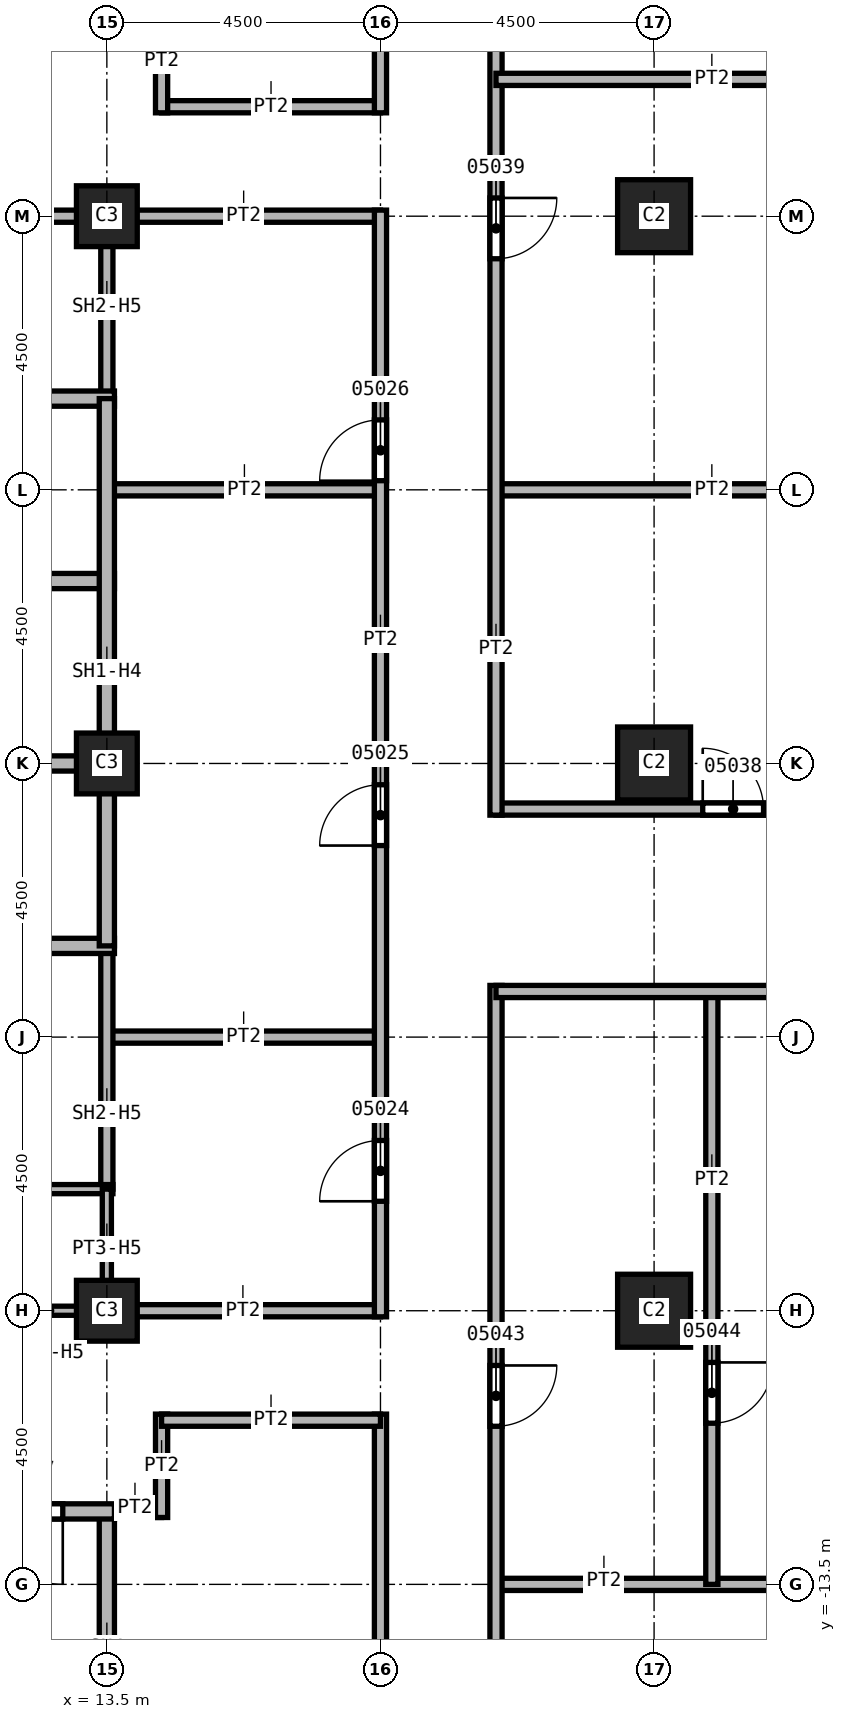
"""IFC4 building model, lengths in metres.
Left out: names, types, materials, properties, quantities, classifications, styles, units other than length and angle.
Written with IfcOpenShell. Run it as: python <this file> out.ifc"""

import sys

from ifc_helpers import new_model, si_unit, direction, frame, frame_2d, origin, origin_2d, place, context, subcontext, project, spatial, rectangle, extrude, element, fill, save


model = new_model("IFC4")
c1 = context("Model", 3, precision=1e-05, world=origin(), true_north=direction((0.0, 1.0)))
c2 = subcontext(c1, "Body", "Model", "MODEL_VIEW")
j1 = project(units=[si_unit("LENGTHUNIT", "METRE"), si_unit("PLANEANGLEUNIT", "RADIAN")], contexts=[c1])
p1 = place(None, origin())
s1 = spatial("IfcSite", under=j1, at=p1, CompositionType="ELEMENT")
p2 = place(p1, origin())
s2 = spatial("IfcBuilding", under=s1, at=p2, CompositionType="ELEMENT")
p3 = place(p2, frame((0.0, 0.0, 112.0)))
s3 = spatial("IfcBuildingStorey", under=s2, at=p3, CompositionType="ELEMENT", Elevation=112.0)
for number, where, z_axis, x_axis in (
    (1, (22.5, 0.0, 0.0), (0.0, 0.0, 1.0), (1.0, 0.0, 0.0)),
    (2, (22.5, 9.0, 0.0), (0.0, 0.0, 1.0), (1.0, 0.0, 0.0)),
    (3, (22.5, -9.0, 0.0), (0.0, 0.0, 1.0), (1.0, 0.0, 0.0)),
):
    element("IfcColumn", number, at=place(p3, frame(where, z_axis=z_axis, x_axis=x_axis)), inside=s3, PredefinedType="COLUMN", context=c2, shape_type="SweptSolid", body=[
        extrude(rectangle(XDim=1.2, YDim=1.2, at=origin_2d()), origin(), (0.0, 0.0, 1.0), 3.7),
    ])
for number, where, z_axis, x_axis in (
    (4, (13.5, 0.0, 0.0), (0.0, 0.0, 1.0), (1.0, 0.0, 0.0)),
    (5, (13.5, 9.0, 0.0), (0.0, 0.0, 1.0), (1.0, 0.0, 0.0)),
    (6, (13.5, -9.0, 0.0), (0.0, 0.0, 1.0), (1.0, 0.0, 0.0)),
):
    element("IfcColumn", number, at=place(p3, frame(where, z_axis=z_axis, x_axis=x_axis)), inside=s3, PredefinedType="COLUMN", context=c2, shape_type="SweptSolid", body=[
        extrude(rectangle(XDim=1.0, YDim=1.0, at=origin_2d()), origin(), (0.0, 0.0, 1.0), 3.7),
    ])
for number, where, z_axis, x_axis in (
    (7, (13.5, -9.0, 0.0), (0.0, 0.0, 1.0), (1.0, 0.0, 0.0)),
    (8, (13.5, -4.5, 0.0), (0.0, 0.0, 1.0), (1.0, 0.0, 0.0)),
    (9, (13.5, 4.5, 0.0), (0.0, 0.0, 1.0), (1.0, 0.0, 0.0)),
):
    element("IfcWall", number, at=place(p3, frame(where, z_axis=z_axis, x_axis=x_axis)), inside=s3, PredefinedType="PARTITIONING", context=c2, shape_type="SweptSolid", body=[
        extrude(rectangle(XDim=4.5, YDim=0.2, at=frame_2d((2.25, 0.0))), origin(), (0.0, 0.0, 1.0), 3.7),
    ])
p4 = place(p3, frame((14.4, -12.3, 0.0), z_axis=(0.0, 0.0, 1.0), x_axis=(-1.0, 0.0, 0.0)))
e10 = element("IfcWall", 10, at=p4, inside=s3, PredefinedType="PARTITIONING", context=c2, shape_type="SweptSolid", body=[
    extrude(rectangle(XDim=1.025, YDim=0.2, at=frame_2d((0.512, 0.0))), origin(), (0.0, 0.0, 1.0), 3.7),
])
p5 = place(p3, frame((14.4, -10.7, 0.0), z_axis=(0.0, 0.0, 1.0), x_axis=(0.0, -1.0, 0.0)))
e11 = element("IfcWall", 11, at=p5, inside=s3, PredefinedType="PARTITIONING", context=c2, shape_type="SweptSolid", body=[
    extrude(rectangle(XDim=1.7, YDim=0.2, at=frame_2d((0.85, 0.0))), origin(), (0.0, 0.0, 1.0), 3.7),
])
p6 = place(p3, frame((18.0, 9.0, 0.0), z_axis=(0.0, 0.0, 1.0), x_axis=(-1.0, 0.0, 0.0)))
e12 = element("IfcWall", 12, at=p6, inside=s3, PredefinedType="PARTITIONING", context=c2, shape_type="SweptSolid", body=[
    extrude(rectangle(XDim=4.5, YDim=0.2, at=frame_2d((2.25, 0.0))), origin(), (0.0, 0.0, 1.0), 3.7),
])
p7 = place(p3, frame((14.4, 10.8, 0.0), z_axis=(0.0, 0.0, 1.0), x_axis=(1.0, 0.0, 0.0)))
e13 = element("IfcWall", 13, at=p7, inside=s3, PredefinedType="PARTITIONING", context=c2, shape_type="SweptSolid", body=[
    extrude(rectangle(XDim=3.6, YDim=0.2, at=frame_2d((1.8, 0.0))), origin(), (0.0, 0.0, 1.0), 3.7),
])
p8 = place(p3, frame((14.4, 12.3, 0.0), z_axis=(0.0, 0.0, 1.0), x_axis=(0.0, -1.0, 0.0)))
e14 = element("IfcWall", 14, at=p8, inside=s3, PredefinedType="PARTITIONING", context=c2, shape_type="SweptSolid", body=[
    extrude(rectangle(XDim=1.6, YDim=0.2, at=frame_2d((0.8, 0.0))), origin(), (0.0, 0.0, 1.0), 3.7),
])
p9 = place(p3, frame((18.0, -24.2, 0.0), z_axis=(0.0, 0.0, 1.0), x_axis=(0.0, 1.0, 0.0)))
e15 = element("IfcWall", 15, at=p9, inside=s3, PredefinedType="PARTITIONING", context=c2, shape_type="SweptSolid", body=[
    extrude(rectangle(XDim=13.5, YDim=0.2, at=frame_2d((6.75, 0.0))), origin(), (0.0, 0.0, 1.0), 3.7),
])
p10 = place(p9, frame((6.4, 0.0, 0.0)))
e16 = element("IfcOpeningElement", 16, at=p10, cuts=e15, PredefinedType="OPENING", context=c2, shape_type="SweptSolid", body=[
    extrude(rectangle(XDim=1.0, YDim=2.1, at=frame_2d((0.5, 1.05))), frame((0.0, 0.1, 0.0), z_axis=(0.0, -1.0, 0.0), x_axis=(1.0, 0.0, 0.0)), (0.0, 0.0, 1.0), 0.2),
])
p11 = place(p3, frame((18.0, -10.8, 0.0), z_axis=(0.0, 0.0, 1.0), x_axis=(-1.0, 0.0, 0.0)))
e17 = element("IfcWall", 17, at=p11, inside=s3, PredefinedType="PARTITIONING", context=c2, shape_type="SweptSolid", body=[
    extrude(rectangle(XDim=3.6, YDim=0.2, at=frame_2d((1.8, 0.0))), origin(), (0.0, 0.0, 1.0), 3.7),
])
p12 = place(p3, frame((18.0, -9.1, 0.0), z_axis=(0.0, 0.0, 1.0), x_axis=(0.0, 1.0, 0.0)))
e18 = element("IfcWall", 18, at=p12, inside=s3, PredefinedType="PARTITIONING", context=c2, shape_type="SweptSolid", body=[
    extrude(rectangle(XDim=18.2, YDim=0.2, at=frame_2d((9.1, 0.0))), origin(), (0.0, 0.0, 1.0), 3.7),
])
p13 = place(p12, frame((1.9, 0.0, 0.0)))
e19 = element("IfcOpeningElement", 19, at=p13, cuts=e18, PredefinedType="OPENING", context=c2, shape_type="SweptSolid", body=[
    extrude(rectangle(XDim=1.0, YDim=2.1, at=frame_2d((0.5, 1.05))), frame((0.0, 0.1, 0.0), z_axis=(0.0, -1.0, 0.0), x_axis=(1.0, 0.0, 0.0)), (0.0, 0.0, 1.0), 0.2),
])
p14 = place(p12, frame((7.75, 0.0, 0.0)))
e20 = element("IfcOpeningElement", 20, at=p14, cuts=e18, PredefinedType="OPENING", context=c2, shape_type="SweptSolid", body=[
    extrude(rectangle(XDim=1.0, YDim=2.1, at=frame_2d((0.5, 1.05))), frame((0.0, 0.1, 0.0), z_axis=(0.0, -1.0, 0.0), x_axis=(1.0, 0.0, 0.0)), (0.0, 0.0, 1.0), 0.2),
])
p15 = place(p12, frame((13.75, 0.0, 0.0)))
e21 = element("IfcOpeningElement", 21, at=p15, cuts=e18, PredefinedType="OPENING", context=c2, shape_type="SweptSolid", body=[
    extrude(rectangle(XDim=1.0, YDim=2.1, at=frame_2d((0.5, 1.05))), frame((0.0, 0.1, 0.0), z_axis=(0.0, -1.0, 0.0), x_axis=(1.0, 0.0, 0.0)), (0.0, 0.0, 1.0), 0.2),
])
p16 = place(p3, frame((18.0, 10.7, 0.0), z_axis=(0.0, 0.0, 1.0), x_axis=(0.0, 1.0, 0.0)))
e22 = element("IfcWall", 22, at=p16, inside=s3, PredefinedType="PARTITIONING", context=c2, shape_type="SweptSolid", body=[
    extrude(rectangle(XDim=13.5, YDim=0.2, at=frame_2d((6.75, 0.0))), origin(), (0.0, 0.0, 1.0), 3.7),
])
p17 = place(p16, frame((9.8, 0.0, 0.0)))
e23 = element("IfcOpeningElement", 23, at=p17, cuts=e22, PredefinedType="OPENING", context=c2, shape_type="SweptSolid", body=[
    extrude(rectangle(XDim=1.0, YDim=2.1, at=frame_2d((0.5, 1.05))), frame((0.0, 0.1, 0.0), z_axis=(0.0, -1.0, 0.0), x_axis=(1.0, 0.0, 0.0)), (0.0, 0.0, 1.0), 0.2),
])
p18 = place(p3, frame((19.9, -13.5, 0.0), z_axis=(0.0, 0.0, 1.0), x_axis=(1.0, 0.0, 0.0)))
e24 = element("IfcWall", 24, at=p18, inside=s3, PredefinedType="PARTITIONING", context=c2, shape_type="SweptSolid", body=[
    extrude(rectangle(XDim=7.2, YDim=0.2, at=frame_2d((3.6, 0.0))), origin(), (0.0, 0.0, 1.0), 3.7),
])
p19 = place(p3, frame((19.9, -3.65, 0.0), z_axis=(0.0, 0.0, 1.0), x_axis=(0.0, -1.0, 0.0)))
e25 = element("IfcWall", 25, at=p19, inside=s3, PredefinedType="PARTITIONING", context=c2, shape_type="SweptSolid", body=[
    extrude(rectangle(XDim=20.85, YDim=0.2, at=frame_2d((10.425, 0.0))), origin(), (0.0, 0.0, 1.0), 3.7),
])
p20 = place(p19, frame((17.5, 0.0, 0.0)))
e26 = element("IfcOpeningElement", 26, at=p20, cuts=e25, PredefinedType="OPENING", context=c2, shape_type="SweptSolid", body=[
    extrude(rectangle(XDim=1.0, YDim=2.1, at=frame_2d((0.5, 1.05))), frame((0.0, 0.1, 0.0), z_axis=(0.0, -1.0, 0.0), x_axis=(1.0, 0.0, 0.0)), (0.0, 0.0, 1.0), 0.2),
])
p21 = place(p19, frame((6.25, 0.0, 0.0)))
e27 = element("IfcOpeningElement", 27, at=p21, cuts=e25, PredefinedType="OPENING", context=c2, shape_type="SweptSolid", body=[
    extrude(rectangle(XDim=1.0, YDim=2.1, at=frame_2d((0.5, 1.05))), frame((0.0, 0.1, 0.0), z_axis=(0.0, -1.0, 0.0), x_axis=(1.0, 0.0, 0.0)), (0.0, 0.0, 1.0), 0.2),
])
p22 = place(p3, frame((19.9, -0.75, 0.0), z_axis=(0.0, 0.0, 1.0), x_axis=(1.0, 0.0, 0.0)))
e28 = element("IfcWall", 28, at=p22, inside=s3, PredefinedType="PARTITIONING", context=c2, shape_type="SweptSolid", body=[
    extrude(rectangle(XDim=13.95, YDim=0.2, at=frame_2d((6.975, 0.0))), origin(), (0.0, 0.0, 1.0), 3.7),
])
p23 = place(p22, frame((3.4, 0.0, 0.0)))
e29 = element("IfcOpeningElement", 29, at=p23, cuts=e28, PredefinedType="OPENING", context=c2, shape_type="SweptSolid", body=[
    extrude(rectangle(XDim=1.0, YDim=2.1, at=frame_2d((0.5, 1.05))), frame((0.0, 0.1, 0.0), z_axis=(0.0, -1.0, 0.0), x_axis=(1.0, 0.0, 0.0)), (0.0, 0.0, 1.0), 0.2),
])
p24 = place(p3, frame((19.9, 4.5, 0.0), z_axis=(0.0, 0.0, 1.0), x_axis=(1.0, 0.0, 0.0)))
e30 = element("IfcWall", 30, at=p24, inside=s3, PredefinedType="PARTITIONING", context=c2, shape_type="SweptSolid", body=[
    extrude(rectangle(XDim=7.2, YDim=0.2, at=frame_2d((3.6, 0.0))), origin(), (0.0, 0.0, 1.0), 3.7),
])
p25 = place(p3, frame((19.9, 24.5, 0.0), z_axis=(0.0, 0.0, 1.0), x_axis=(0.0, -1.0, 0.0)))
e31 = element("IfcWall", 31, at=p25, inside=s3, PredefinedType="PARTITIONING", context=c2, shape_type="SweptSolid", body=[
    extrude(rectangle(XDim=25.35, YDim=0.2, at=frame_2d((12.675, 0.0))), origin(), (0.0, 0.0, 1.0), 3.7),
])
p26 = place(p25, frame((15.2, 0.0, 0.0)))
e32 = element("IfcOpeningElement", 32, at=p26, cuts=e31, PredefinedType="OPENING", context=c2, shape_type="SweptSolid", body=[
    extrude(rectangle(XDim=1.0, YDim=2.1, at=frame_2d((0.5, 1.05))), frame((0.0, 0.1, 0.0), z_axis=(0.0, -1.0, 0.0), x_axis=(1.0, 0.0, 0.0)), (0.0, 0.0, 1.0), 0.2),
])
p27 = place(p25, frame((7.55, 0.0, 0.0)))
e33 = element("IfcOpeningElement", 33, at=p27, cuts=e31, PredefinedType="OPENING", context=c2, shape_type="SweptSolid", body=[
    extrude(rectangle(XDim=1.0, YDim=2.1, at=frame_2d((0.5, 1.05))), frame((0.0, 0.1, 0.0), z_axis=(0.0, -1.0, 0.0), x_axis=(1.0, 0.0, 0.0)), (0.0, 0.0, 1.0), 0.2),
])
p28 = place(p25, frame((0.55, 0.0, 0.0)))
e34 = element("IfcOpeningElement", 34, at=p28, cuts=e31, PredefinedType="OPENING", context=c2, shape_type="SweptSolid", body=[
    extrude(rectangle(XDim=1.0, YDim=2.1, at=frame_2d((0.5, 1.05))), frame((0.0, 0.1, 0.0), z_axis=(0.0, -1.0, 0.0), x_axis=(1.0, 0.0, 0.0)), (0.0, 0.0, 1.0), 0.2),
])
p29 = place(p3, frame((19.9, 11.25, 0.0), z_axis=(0.0, 0.0, 1.0), x_axis=(1.0, 0.0, 0.0)))
e35 = element("IfcWall", 35, at=p29, inside=s3, PredefinedType="PARTITIONING", context=c2, shape_type="SweptSolid", body=[
    extrude(rectangle(XDim=7.2, YDim=0.2, at=frame_2d((3.6, 0.0))), origin(), (0.0, 0.0, 1.0), 3.7),
])
p30 = place(p3, frame((23.45, -3.75, 0.0), z_axis=(0.0, 0.0, 1.0), x_axis=(0.0, -1.0, 0.0)))
e36 = element("IfcWall", 36, at=p30, inside=s3, PredefinedType="PARTITIONING", context=c2, shape_type="SweptSolid", body=[
    extrude(rectangle(XDim=9.75, YDim=0.2, at=frame_2d((4.875, 0.0))), origin(), (0.0, 0.0, 1.0), 3.7),
])
p31 = place(p30, frame((6.1, 0.0, 0.0)))
e37 = element("IfcOpeningElement", 37, at=p31, cuts=e36, PredefinedType="OPENING", context=c2, shape_type="SweptSolid", body=[
    extrude(rectangle(XDim=1.0, YDim=2.1, at=frame_2d((0.5, 1.05))), frame((0.0, 0.1, 0.0), z_axis=(0.0, -1.0, 0.0), x_axis=(1.0, 0.0, 0.0)), (0.0, 0.0, 1.0), 0.2),
])
p32 = place(p3, frame((33.85, -3.75, 0.0), z_axis=(0.0, 0.0, 1.0), x_axis=(-1.0, 0.0, 0.0)))
e38 = element("IfcWall", 38, at=p32, inside=s3, PredefinedType="PARTITIONING", context=c2, shape_type="SweptSolid", body=[
    extrude(rectangle(XDim=13.95, YDim=0.2, at=frame_2d((6.975, 0.0))), origin(), (0.0, 0.0, 1.0), 3.7),
])
p33 = place(p3, frame((10.5, 9.0, 0.0), z_axis=(0.0, 0.0, 1.0), x_axis=(1.0, 0.0, 0.0)))
e39 = element("IfcWall", 39, at=p33, inside=s3, PredefinedType="SOLIDWALL", context=c2, shape_type="SweptSolid", body=[
    extrude(rectangle(XDim=3.1, YDim=0.2, at=frame_2d((1.55, 0.0))), origin(), (0.0, 0.0, 1.0), 2.938),
])
p34 = place(p3, frame((13.5, -3.0, 0.0), z_axis=(0.0, 0.0, 1.0), x_axis=(0.0, -1.0, 0.0)))
e40 = element("IfcWall", 40, at=p34, inside=s3, PredefinedType="SOLIDWALL", context=c2, shape_type="SweptSolid", body=[
    extrude(rectangle(XDim=4.0, YDim=0.2, at=frame_2d((2.0, 0.0))), origin(), (0.0, 0.0, 1.0), 2.938),
])
p35 = place(p3, frame((13.5, 9.1, 0.0), z_axis=(0.0, 0.0, 1.0), x_axis=(0.0, -1.0, 0.0)))
e41 = element("IfcWall", 41, at=p35, inside=s3, PredefinedType="SOLIDWALL", context=c2, shape_type="SweptSolid", body=[
    extrude(rectangle(XDim=3.1, YDim=0.2, at=frame_2d((1.55, 0.0))), origin(), (0.0, 0.0, 1.0), 2.938),
])
p36 = place(p3, frame((4.375, 3.0, 0.0), z_axis=(0.0, 0.0, 1.0), x_axis=(1.0, 0.0, 0.0)))
e42 = element("IfcWall", 42, at=p36, inside=s3, PredefinedType="SOLIDWALL", context=c2, shape_type="SweptSolid", body=[
    extrude(rectangle(XDim=9.25, YDim=0.25, at=frame_2d((4.625, 0.0))), origin(), (0.0, 0.0, 1.0), 3.7),
])
p37 = place(p36, frame((4.125, 0.0, 0.0)))
e43 = element("IfcOpeningElement", 43, at=p37, cuts=e42, PredefinedType="OPENING", context=c2, shape_type="SweptSolid", body=[
    extrude(rectangle(XDim=1.1, YDim=2.1, at=frame_2d((0.55, 1.05))), frame((0.0, 0.125, 0.0), z_axis=(0.0, -1.0, 0.0), x_axis=(1.0, 0.0, 0.0)), (0.0, 0.0, 1.0), 0.25),
])
p38 = place(p3, frame((7.5, -3.0, 0.0), z_axis=(0.0, 0.0, 1.0), x_axis=(1.0, 0.0, 0.0)))
e44 = element("IfcWall", 44, at=p38, inside=s3, PredefinedType="SOLIDWALL", context=c2, shape_type="SweptSolid", body=[
    extrude(rectangle(XDim=6.125, YDim=0.25, at=frame_2d((3.062, 0.0))), origin(), (0.0, 0.0, 1.0), 3.7),
])
p39 = place(p38, frame((1.0, 0.0, 0.0)))
e45 = element("IfcOpeningElement", 45, at=p39, cuts=e44, PredefinedType="OPENING", context=c2, shape_type="SweptSolid", body=[
    extrude(rectangle(XDim=1.1, YDim=2.1, at=frame_2d((0.55, 1.05))), frame((0.0, 0.125, 0.0), z_axis=(0.0, -1.0, 0.0), x_axis=(1.0, 0.0, 0.0)), (0.0, 0.0, 1.0), 0.25),
])
for number, where, z_axis, x_axis in (
    (46, (10.5, 0.0, 0.0), (0.0, 0.0, 1.0), (1.0, 0.0, 0.0)),
    (47, (10.5, 6.0, 0.0), (0.0, 0.0, 1.0), (1.0, 0.0, 0.0)),
):
    element("IfcWall", number, at=place(p3, frame(where, z_axis=z_axis, x_axis=x_axis)), inside=s3, PredefinedType="SOLIDWALL", context=c2, shape_type="SweptSolid", body=[
        extrude(rectangle(XDim=3.125, YDim=0.25, at=frame_2d((1.562, 0.0))), origin(), (0.0, 0.0, 1.0), 3.7),
    ])
p40 = place(p3, frame((13.5, 6.0, 0.0), z_axis=(0.0, 0.0, 1.0), x_axis=(0.0, -1.0, 0.0)))
e48 = element("IfcWall", 48, at=p40, inside=s3, PredefinedType="SOLIDWALL", context=c2, shape_type="SweptSolid", body=[
    extrude(rectangle(XDim=9.0, YDim=0.25, at=frame_2d((4.5, 0.0))), origin(), (0.0, 0.0, 1.0), 2.938),
])
p41 = place(p3, frame((13.5, -12.3, 0.0), z_axis=(0.0, 0.0, 1.0), x_axis=(0.0, -1.0, 0.0)))
e49 = element("IfcWall", 49, at=p41, inside=s3, PredefinedType="SOLIDWALL", context=c2, shape_type="SweptSolid", body=[
    extrude(rectangle(XDim=4.625, YDim=0.25, at=frame_2d((2.312, 0.0))), origin(), (0.0, 0.0, 1.0), 3.7),
])
p42 = place(p3, frame((13.625, -12.3, 0.0), z_axis=(0.0, 0.0, 1.0), x_axis=(-1.0, 0.0, 0.0)))
e50 = element("IfcWall", 50, at=p42, inside=s3, PredefinedType="SOLIDWALL", context=c2, shape_type="SweptSolid", body=[
    extrude(rectangle(XDim=9.25, YDim=0.25, at=frame_2d((4.625, 0.0))), origin(), (0.0, 0.0, 1.0), 3.7),
])
p43 = place(p42, frame((0.85, 0.0, 0.0)))
e51 = element("IfcOpeningElement", 51, at=p43, cuts=e50, PredefinedType="OPENING", context=c2, shape_type="SweptSolid", body=[
    extrude(rectangle(XDim=1.2, YDim=2.1, at=frame_2d((0.6, 1.05))), frame((0.0, 0.125, 0.0), z_axis=(0.0, -1.0, 0.0), x_axis=(1.0, 0.0, 0.0)), (0.0, 0.0, 1.0), 0.25),
])
p44 = place(p3, frame((10.5, -7.0, 0.0), z_axis=(0.0, 0.0, 1.0), x_axis=(1.0, 0.0, 0.0)))
e52 = element("IfcWall", 52, at=p44, inside=s3, PredefinedType="PARTITIONING", context=c2, shape_type="SweptSolid", body=[
    extrude(rectangle(XDim=3.1, YDim=0.15, at=frame_2d((1.55, 0.0))), origin(), (0.0, 0.0, 1.0), 3.7),
])
p45 = place(p3, frame((13.5, -7.0, 0.0), z_axis=(0.0, 0.0, 1.0), x_axis=(0.0, -1.0, 0.0)))
e53 = element("IfcWall", 53, at=p45, inside=s3, PredefinedType="PARTITIONING", context=c2, shape_type="SweptSolid", body=[
    extrude(rectangle(XDim=2.1, YDim=0.15, at=frame_2d((1.05, 0.0))), origin(), (0.0, 0.0, 1.0), 2.938),
])
p46 = place(p3, frame((13.575, -9.0, 0.0), z_axis=(0.0, 0.0, 1.0), x_axis=(-1.0, 0.0, 0.0)))
e54 = element("IfcWall", 54, at=p46, inside=s3, PredefinedType="PARTITIONING", context=c2, shape_type="SweptSolid", body=[
    extrude(rectangle(XDim=3.075, YDim=0.15, at=frame_2d((1.538, 0.0))), origin(), (0.0, 0.0, 1.0), 2.938),
])
p47 = place(p46, frame((1.9, 0.0, 0.0)))
e55 = element("IfcOpeningElement", 55, at=p47, cuts=e54, PredefinedType="OPENING", context=c2, shape_type="SweptSolid", body=[
    extrude(rectangle(XDim=0.9, YDim=2.1, at=frame_2d((0.45, 1.05))), frame((0.0, 0.075, 0.0), z_axis=(0.0, -1.0, 0.0), x_axis=(1.0, 0.0, 0.0)), (0.0, 0.0, 1.0), 0.15),
])
p48 = place(p43, origin())
e56 = element("IfcDoor", 56, at=p48, inside=s3, OperationType="SINGLE_SWING_RIGHT", PredefinedType="DOOR", context=c2, shape_type="SweptSolid", body=[
    extrude(rectangle(XDim=1.2, YDim=2.1, at=frame_2d((0.6, 1.05))), frame((0.0, 0.025, 0.0), z_axis=(0.0, -1.0, 0.0), x_axis=(1.0, 0.0, 0.0)), (0.0, 0.0, 1.0), 0.05),
])
fill(e51, e56)
p49 = place(p13, origin())
e57 = element("IfcDoor", 57, at=p49, inside=s3, OperationType="SINGLE_SWING_LEFT", PredefinedType="DOOR", context=c2, shape_type="SweptSolid", body=[
    extrude(rectangle(XDim=1.0, YDim=2.1, at=frame_2d((0.5, 1.05))), frame((0.0, 0.025, 0.0), z_axis=(0.0, -1.0, 0.0), x_axis=(1.0, 0.0, 0.0)), (0.0, 0.0, 1.0), 0.05),
])
fill(e19, e57)
p50 = place(p14, origin())
e58 = element("IfcDoor", 58, at=p50, inside=s3, OperationType="SINGLE_SWING_RIGHT", PredefinedType="DOOR", context=c2, shape_type="SweptSolid", body=[
    extrude(rectangle(XDim=1.0, YDim=2.1, at=frame_2d((0.5, 1.05))), frame((0.0, 0.025, 0.0), z_axis=(0.0, -1.0, 0.0), x_axis=(1.0, 0.0, 0.0)), (0.0, 0.0, 1.0), 0.05),
])
fill(e20, e58)
p51 = place(p15, origin())
e59 = element("IfcDoor", 59, at=p51, inside=s3, OperationType="SINGLE_SWING_LEFT", PredefinedType="DOOR", context=c2, shape_type="SweptSolid", body=[
    extrude(rectangle(XDim=1.0, YDim=2.1, at=frame_2d((0.5, 1.05))), frame((0.0, 0.025, 0.0), z_axis=(0.0, -1.0, 0.0), x_axis=(1.0, 0.0, 0.0)), (0.0, 0.0, 1.0), 0.05),
])
fill(e21, e59)
p52 = place(p23, origin())
e60 = element("IfcDoor", 60, at=p52, inside=s3, OperationType="SINGLE_SWING_LEFT", PredefinedType="DOOR", context=c2, shape_type="SweptSolid", body=[
    extrude(rectangle(XDim=1.0, YDim=2.1, at=frame_2d((0.5, 1.05))), frame((0.0, 0.025, 0.0), z_axis=(0.0, -1.0, 0.0), x_axis=(1.0, 0.0, 0.0)), (0.0, 0.0, 1.0), 0.05),
])
fill(e29, e60)
p53 = place(p26, origin())
e61 = element("IfcDoor", 61, at=p53, inside=s3, OperationType="SINGLE_SWING_RIGHT", PredefinedType="DOOR", context=c2, shape_type="SweptSolid", body=[
    extrude(rectangle(XDim=1.0, YDim=2.1, at=frame_2d((0.5, 1.05))), frame((0.0, 0.025, 0.0), z_axis=(0.0, -1.0, 0.0), x_axis=(1.0, 0.0, 0.0)), (0.0, 0.0, 1.0), 0.05),
])
fill(e32, e61)
p54 = place(p21, origin())
e62 = element("IfcDoor", 62, at=p54, inside=s3, OperationType="SINGLE_SWING_RIGHT", PredefinedType="DOOR", context=c2, shape_type="SweptSolid", body=[
    extrude(rectangle(XDim=1.0, YDim=2.1, at=frame_2d((0.5, 1.05))), frame((0.0, 0.025, 0.0), z_axis=(0.0, -1.0, 0.0), x_axis=(1.0, 0.0, 0.0)), (0.0, 0.0, 1.0), 0.05),
])
fill(e27, e62)
p55 = place(p31, origin())
e63 = element("IfcDoor", 63, at=p55, inside=s3, OperationType="SINGLE_SWING_LEFT", PredefinedType="DOOR", context=c2, shape_type="SweptSolid", body=[
    extrude(rectangle(XDim=1.0, YDim=2.1, at=frame_2d((0.5, 1.05))), frame((0.0, 0.025, 0.0), z_axis=(0.0, -1.0, 0.0), x_axis=(1.0, 0.0, 0.0)), (0.0, 0.0, 1.0), 0.05),
])
fill(e37, e63)
save(model, sys.argv[1])
